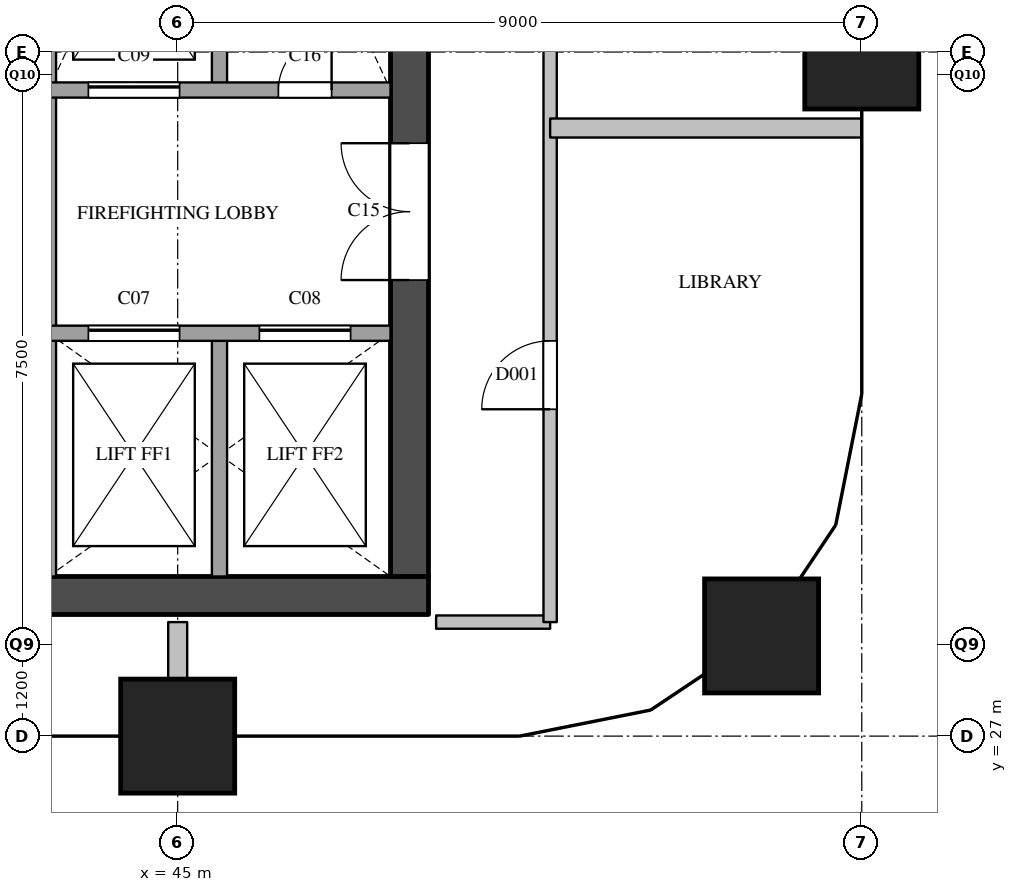
"""IFC4 building model, lengths in metres.
Left out: names, types, materials, properties, quantities, classifications, styles, units other than length and angle.
Written with IfcOpenShell. Run it as: python <this file> out.ifc"""

import sys

from ifc_helpers import new_model, si_unit, direction, frame, frame_2d, origin, origin_2d, place, context, subcontext, project, spatial, rectangle, extrude, element, fill, save


model = new_model("IFC4")
c1 = context("Model", 3, precision=1e-05, world=origin(), true_north=direction((0.0, 1.0)))
c2 = subcontext(c1, "Body", "Model", "MODEL_VIEW")
j1 = project(units=[si_unit("LENGTHUNIT", "METRE"), si_unit("PLANEANGLEUNIT", "RADIAN")], contexts=[c1])
p1 = place(None, origin())
s1 = spatial("IfcSite", under=j1, at=p1, CompositionType="ELEMENT")
p2 = place(p1, origin())
s2 = spatial("IfcBuilding", under=s1, at=p2, CompositionType="ELEMENT")
p3 = place(p2, frame((0.0, 0.0, 134.9)))
s3 = spatial("IfcBuildingStorey", under=s2, at=p3, CompositionType="ELEMENT", Elevation=134.9)
for number, where, z_axis, x_axis in (
    (1, (45.0, 27.0, 0.0), (0.0, 0.0, 1.0), (1.0, 0.0, 0.0)),
    (2, (52.682, 28.318, 0.0), (0.0, 0.0, 1.0), (1.0, 0.0, 0.0)),
    (3, (54.0, 36.0, 0.0), (0.0, 0.0, 1.0), (1.0, 0.0, 0.0)),
):
    element("IfcColumn", number, at=place(p3, frame(where, z_axis=z_axis, x_axis=x_axis)), inside=s3, PredefinedType="COLUMN", context=c2, shape_type="SweptSolid", body=[
        extrude(rectangle(XDim=1.5, YDim=1.5, at=origin_2d()), origin(), (0.0, 0.0, 1.0), 3.9),
    ])
p4 = place(p3, frame((36.1, 28.85, 0.0), z_axis=(0.0, 0.0, 1.0), x_axis=(1.0, 0.0, 0.0)))
e4 = element("IfcWall", 4, at=p4, inside=s3, PredefinedType="SHEAR", context=c2, shape_type="SweptSolid", body=[
    extrude(rectangle(XDim=12.2, YDim=0.5, at=frame_2d((6.1, 0.0))), origin(), (0.0, 0.0, 1.0), 3.6),
])
p5 = place(p4, frame((0.95, 0.0, 0.0)))
e5 = element("IfcOpeningElement", 5, at=p5, cuts=e4, PredefinedType="OPENING", context=c2, shape_type="SweptSolid", body=[
    extrude(rectangle(XDim=1.2, YDim=2.1, at=frame_2d((0.6, 1.05))), frame((0.0, 0.26, 0.0), z_axis=(0.0, -1.0, 0.0), x_axis=(1.0, 0.0, 0.0)), (0.0, 0.0, 1.0), 0.52),
])
p6 = place(p4, frame((3.05, 0.0, 0.0)))
e6 = element("IfcOpeningElement", 6, at=p6, cuts=e4, PredefinedType="OPENING", context=c2, shape_type="SweptSolid", body=[
    extrude(rectangle(XDim=1.2, YDim=2.1, at=frame_2d((0.6, 1.05))), frame((0.0, 0.26, 0.0), z_axis=(0.0, -1.0, 0.0), x_axis=(1.0, 0.0, 0.0)), (0.0, 0.0, 1.0), 0.52),
])
p7 = place(p4, frame((5.15, 0.0, 0.0)))
e7 = element("IfcOpeningElement", 7, at=p7, cuts=e4, PredefinedType="OPENING", context=c2, shape_type="SweptSolid", body=[
    extrude(rectangle(XDim=1.2, YDim=2.1, at=frame_2d((0.6, 1.05))), frame((0.0, 0.26, 0.0), z_axis=(0.0, -1.0, 0.0), x_axis=(1.0, 0.0, 0.0)), (0.0, 0.0, 1.0), 0.52),
])
p8 = place(p3, frame((48.05, 29.1, 0.0), z_axis=(0.0, 0.0, 1.0), x_axis=(0.0, 1.0, 0.0)))
e8 = element("IfcWall", 8, at=p8, inside=s3, PredefinedType="SHEAR", context=c2, shape_type="SweptSolid", body=[
    extrude(rectangle(XDim=20.3, YDim=0.5, at=frame_2d((10.15, 0.0))), origin(), (0.0, 0.0, 1.0), 3.6),
])
p9 = place(p8, frame((12.5, 0.0, 0.0)))
e9 = element("IfcOpeningElement", 9, at=p9, cuts=e8, PredefinedType="OPENING", context=c2, shape_type="SweptSolid", body=[
    extrude(rectangle(XDim=0.7, YDim=2.1, at=frame_2d((0.35, 1.05))), frame((0.0, 0.26, 0.0), z_axis=(0.0, -1.0, 0.0), x_axis=(1.0, 0.0, 0.0)), (0.0, 0.0, 1.0), 0.52),
])
p10 = place(p8, frame((3.9, 0.0, 0.0)))
e10 = element("IfcOpeningElement", 10, at=p10, cuts=e8, PredefinedType="OPENING", context=c2, shape_type="SweptSolid", body=[
    extrude(rectangle(XDim=1.8, YDim=2.1, at=frame_2d((0.9, 1.05))), frame((0.0, 0.26, 0.0), z_axis=(0.0, -1.0, 0.0), x_axis=(1.0, 0.0, 0.0)), (0.0, 0.0, 1.0), 0.52),
])
p11 = place(p3, frame((43.3, 29.1, 0.0), z_axis=(0.0, 0.0, 1.0), x_axis=(0.0, 1.0, 0.0)))
e11 = element("IfcWall", 11, at=p11, inside=s3, PredefinedType="SOLIDWALL", context=c2, shape_type="SweptSolid", body=[
    extrude(rectangle(XDim=9.9, YDim=0.2, at=frame_2d((4.95, 0.0))), origin(), (0.0, 0.0, 1.0), 3.6),
])
for number, where, z_axis, x_axis in (
    (12, (45.55, 29.1, 0.0), (0.0, 0.0, 1.0), (0.0, 1.0, 0.0)),
    (13, (45.55, 35.5, 0.0), (0.0, 0.0, 1.0), (0.0, 1.0, 0.0)),
):
    element("IfcWall", number, at=place(p3, frame(where, z_axis=z_axis, x_axis=x_axis)), inside=s3, PredefinedType="SOLIDWALL", context=c2, shape_type="SweptSolid", body=[
        extrude(rectangle(XDim=3.2, YDim=0.2, at=frame_2d((1.6, 0.0))), origin(), (0.0, 0.0, 1.0), 3.6),
    ])
p12 = place(p3, frame((36.6, 32.3, 0.0), z_axis=(0.0, 0.0, 1.0), x_axis=(1.0, 0.0, 0.0)))
e14 = element("IfcWall", 14, at=p12, inside=s3, PredefinedType="SOLIDWALL", context=c2, shape_type="SweptSolid", body=[
    extrude(rectangle(XDim=11.2, YDim=0.2, at=frame_2d((5.6, 0.0))), origin(), (0.0, 0.0, 1.0), 3.6),
])
p13 = place(p12, frame((7.225, 0.0, 0.0)))
e15 = element("IfcOpeningElement", 15, at=p13, cuts=e14, PredefinedType="OPENING", context=c2, shape_type="SweptSolid", body=[
    extrude(rectangle(XDim=1.2, YDim=2.1, at=frame_2d((0.6, 1.05))), frame((0.0, 0.11, 0.0), z_axis=(0.0, -1.0, 0.0), x_axis=(1.0, 0.0, 0.0)), (0.0, 0.0, 1.0), 0.22),
])
p14 = place(p12, frame((9.475, 0.0, 0.0)))
e16 = element("IfcOpeningElement", 16, at=p14, cuts=e14, PredefinedType="OPENING", context=c2, shape_type="SweptSolid", body=[
    extrude(rectangle(XDim=1.2, YDim=2.1, at=frame_2d((0.6, 1.05))), frame((0.0, 0.11, 0.0), z_axis=(0.0, -1.0, 0.0), x_axis=(1.0, 0.0, 0.0)), (0.0, 0.0, 1.0), 0.22),
])
p15 = place(p3, frame((43.3, 35.5, 0.0), z_axis=(0.0, 0.0, 1.0), x_axis=(1.0, 0.0, 0.0)))
e17 = element("IfcWall", 17, at=p15, inside=s3, PredefinedType="SOLIDWALL", context=c2, shape_type="SweptSolid", body=[
    extrude(rectangle(XDim=4.5, YDim=0.2, at=frame_2d((2.25, 0.0))), origin(), (0.0, 0.0, 1.0), 3.6),
])
p16 = place(p15, frame((0.525, 0.0, 0.0)))
e18 = element("IfcOpeningElement", 18, at=p16, cuts=e17, PredefinedType="OPENING", context=c2, shape_type="SweptSolid", body=[
    extrude(rectangle(XDim=1.2, YDim=2.1, at=frame_2d((0.6, 1.05))), frame((0.0, 0.11, 0.0), z_axis=(0.0, -1.0, 0.0), x_axis=(1.0, 0.0, 0.0)), (0.0, 0.0, 1.0), 0.22),
])
p17 = place(p15, frame((3.025, 0.0, 0.0)))
e19 = element("IfcOpeningElement", 19, at=p17, cuts=e17, PredefinedType="OPENING", context=c2, shape_type="SweptSolid", body=[
    extrude(rectangle(XDim=0.7, YDim=2.1, at=frame_2d((0.35, 1.05))), frame((0.0, 0.11, 0.0), z_axis=(0.0, -1.0, 0.0), x_axis=(1.0, 0.0, 0.0)), (0.0, 0.0, 1.0), 0.22),
])
p18 = place(p3, frame((48.4, 28.5, 0.0), z_axis=(0.0, 0.0, 1.0), x_axis=(1.0, 0.0, 0.0)))
e20 = element("IfcWall", 20, at=p18, inside=s3, PredefinedType="PARTITIONING", context=c2, shape_type="SweptSolid", body=[
    extrude(rectangle(XDim=1.5, YDim=0.175, at=frame_2d((0.75, 0.0))), origin(), (0.0, 0.0, 1.0), 3.6),
])
p19 = place(p3, frame((49.9, 28.5, 0.0), z_axis=(0.0, 0.0, 1.0), x_axis=(0.0, 1.0, 0.0)))
e21 = element("IfcWall", 21, at=p19, inside=s3, PredefinedType="PARTITIONING", context=c2, shape_type="SweptSolid", body=[
    extrude(rectangle(XDim=23.0, YDim=0.175, at=frame_2d((11.5, 0.0))), origin(), (0.0, 0.0, 1.0), 3.6),
])
p20 = place(p19, frame((2.8, 0.0, 0.0)))
e22 = element("IfcOpeningElement", 22, at=p20, cuts=e21, PredefinedType="OPENING", context=c2, shape_type="SweptSolid", body=[
    extrude(rectangle(XDim=0.9, YDim=2.1, at=frame_2d((0.45, 1.05))), frame((0.0, 0.097, 0.0), z_axis=(0.0, -1.0, 0.0), x_axis=(1.0, 0.0, 0.0)), (0.0, 0.0, 1.0), 0.195),
])
p21 = place(p19, frame((11.05, 0.0, 0.0)))
e23 = element("IfcOpeningElement", 23, at=p21, cuts=e21, PredefinedType="OPENING", context=c2, shape_type="SweptSolid", body=[
    extrude(rectangle(XDim=0.9, YDim=2.1, at=frame_2d((0.45, 1.05))), frame((0.0, 0.097, 0.0), z_axis=(0.0, -1.0, 0.0), x_axis=(1.0, 0.0, 0.0)), (0.0, 0.0, 1.0), 0.195),
])
p22 = place(p19, frame((19.3, 0.0, 0.0)))
e24 = element("IfcOpeningElement", 24, at=p22, cuts=e21, PredefinedType="OPENING", context=c2, shape_type="SweptSolid", body=[
    extrude(rectangle(XDim=0.9, YDim=2.1, at=frame_2d((0.45, 1.05))), frame((0.0, 0.097, 0.0), z_axis=(0.0, -1.0, 0.0), x_axis=(1.0, 0.0, 0.0)), (0.0, 0.0, 1.0), 0.195),
])
p23 = place(p3, frame((49.9, 35.0, 0.0), z_axis=(0.0, 0.0, 1.0), x_axis=(1.0, 0.0, 0.0)))
e25 = element("IfcWall", 25, at=p23, inside=s3, PredefinedType="PARTITIONING", context=c2, shape_type="SweptSolid", body=[
    extrude(rectangle(XDim=4.1, YDim=0.25, at=frame_2d((2.05, 0.0))), origin(), (0.0, 0.0, 1.0), 2.6),
])
p24 = place(p3, frame((45.0, 27.0, 0.0), z_axis=(0.0, 0.0, 1.0), x_axis=(0.0, 1.0, 0.0)))
e26 = element("IfcWall", 26, at=p24, inside=s3, PredefinedType="PARTITIONING", context=c2, shape_type="SweptSolid", body=[
    extrude(rectangle(XDim=1.5, YDim=0.25, at=frame_2d((0.75, 0.0))), origin(), (0.0, 0.0, 1.0), 3.6),
])
p25 = place(p13, origin())
e27 = element("IfcDoor", 27, at=p25, inside=s3, OperationType="SLIDING_TO_LEFT", PredefinedType="DOOR", context=c2, shape_type="SweptSolid", body=[
    extrude(rectangle(XDim=1.2, YDim=2.1, at=frame_2d((0.6, 1.05))), frame((0.0, 0.025, 0.0), z_axis=(0.0, -1.0, 0.0), x_axis=(1.0, 0.0, 0.0)), (0.0, 0.0, 1.0), 0.05),
])
fill(e15, e27)
p26 = place(p14, origin())
e28 = element("IfcDoor", 28, at=p26, inside=s3, OperationType="SLIDING_TO_LEFT", PredefinedType="DOOR", context=c2, shape_type="SweptSolid", body=[
    extrude(rectangle(XDim=1.2, YDim=2.1, at=frame_2d((0.6, 1.05))), frame((0.0, 0.025, 0.0), z_axis=(0.0, -1.0, 0.0), x_axis=(1.0, 0.0, 0.0)), (0.0, 0.0, 1.0), 0.05),
])
fill(e16, e28)
p27 = place(p16, origin())
e29 = element("IfcDoor", 29, at=p27, inside=s3, OperationType="SLIDING_TO_LEFT", PredefinedType="DOOR", context=c2, shape_type="SweptSolid", body=[
    extrude(rectangle(XDim=1.2, YDim=2.1, at=frame_2d((0.6, 1.05))), frame((0.0, 0.025, 0.0), z_axis=(0.0, -1.0, 0.0), x_axis=(1.0, 0.0, 0.0)), (0.0, 0.0, 1.0), 0.05),
])
fill(e18, e29)
p28 = place(p10, origin())
e30 = element("IfcDoor", 30, at=p28, inside=s3, OperationType="DOUBLE_DOOR_SINGLE_SWING", PredefinedType="DOOR", context=c2, shape_type="SweptSolid", body=[
    extrude(rectangle(XDim=1.8, YDim=2.1, at=frame_2d((0.9, 1.05))), frame((0.0, 0.025, 0.0), z_axis=(0.0, -1.0, 0.0), x_axis=(1.0, 0.0, 0.0)), (0.0, 0.0, 1.0), 0.05),
])
fill(e10, e30)
p29 = place(p17, origin())
e31 = element("IfcDoor", 31, at=p29, inside=s3, OperationType="SINGLE_SWING_RIGHT", PredefinedType="DOOR", context=c2, shape_type="SweptSolid", body=[
    extrude(rectangle(XDim=0.7, YDim=2.1, at=frame_2d((0.35, 1.05))), frame((0.0, 0.025, 0.0), z_axis=(0.0, -1.0, 0.0), x_axis=(1.0, 0.0, 0.0)), (0.0, 0.0, 1.0), 0.05),
])
fill(e19, e31)
p30 = place(p20, origin())
e32 = element("IfcDoor", 32, at=p30, inside=s3, OperationType="SINGLE_SWING_LEFT", PredefinedType="DOOR", context=c2, shape_type="SweptSolid", body=[
    extrude(rectangle(XDim=0.9, YDim=2.1, at=frame_2d((0.45, 1.05))), frame((0.0, 0.025, 0.0), z_axis=(0.0, -1.0, 0.0), x_axis=(1.0, 0.0, 0.0)), (0.0, 0.0, 1.0), 0.05),
])
fill(e22, e32)
save(model, sys.argv[1])
